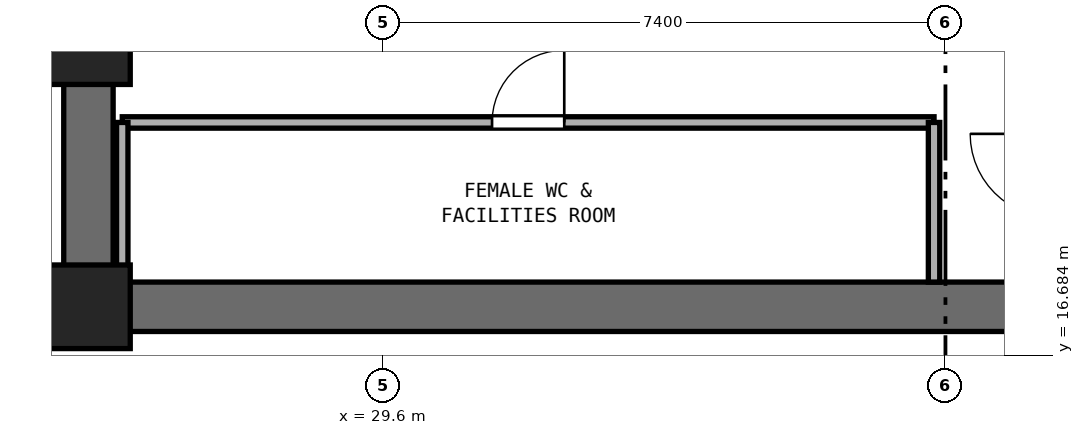
"""IFC4 building model, lengths in metres.
Left out: names, types, materials, properties, quantities, classifications, styles, units other than length and angle.
Written with IfcOpenShell. Run it as: python <this file> out.ifc"""

import sys

from ifc_helpers import new_model, si_unit, direction, frame, frame_2d, origin, origin_2d, place, context, subcontext, project, spatial, rectangle, extrude, element, fill, save


model = new_model("IFC4")
c1 = context("Model", 3, precision=1e-05, world=origin(), true_north=direction((0.0, 1.0)))
c2 = subcontext(c1, "Body", "Model", "MODEL_VIEW")
j1 = project(units=[si_unit("LENGTHUNIT", "METRE"), si_unit("PLANEANGLEUNIT", "RADIAN")], contexts=[c1])
p1 = place(None, origin())
s1 = spatial("IfcSite", under=j1, at=p1, CompositionType="ELEMENT")
p2 = place(p1, origin())
s2 = spatial("IfcBuilding", under=s1, at=p2, CompositionType="ELEMENT")
p3 = place(p2, frame((0.0, 0.0, 10.0)))
s3 = spatial("IfcBuildingStorey", under=s2, at=p3, CompositionType="ELEMENT", Elevation=10.0)
p4 = place(p3, frame((25.4, 17.325, 0.0), z_axis=(0.0, 0.0, 1.0), x_axis=(1.0, 0.0, 0.0)))
e1 = element("IfcWall", 1, at=p4, inside=s3, PredefinedType="SHEAR", context=c2, shape_type="SweptSolid", body=[
    extrude(rectangle(XDim=23.2, YDim=0.65, at=frame_2d((11.6, 0.0))), origin(), (0.0, 0.0, 1.0), 4.68),
])
p5 = place(p3, frame((25.725, 17.65, 0.0), z_axis=(0.0, 0.0, 1.0), x_axis=(0.0, 1.0, 0.0)))
e2 = element("IfcWall", 2, at=p5, inside=s3, PredefinedType="SHEAR", context=c2, shape_type="SweptSolid", body=[
    extrude(rectangle(XDim=15.1, YDim=0.65, at=frame_2d((7.55, 0.0))), origin(), (0.0, 0.0, 1.0), 4.68),
])
p6 = place(p5, frame((6.8, 0.0, 0.0)))
e3 = element("IfcOpeningElement", 3, at=p6, cuts=e2, PredefinedType="OPENING", context=c2, shape_type="SweptSolid", body=[
    extrude(rectangle(XDim=1.5, YDim=2.15, at=frame_2d((0.75, 1.075))), frame((0.0, 0.335, 0.0), z_axis=(0.0, -1.0, 0.0), x_axis=(1.0, 0.0, 0.0)), (0.0, 0.0, 1.0), 0.67),
])
for number, where, z_axis, x_axis in (
    (4, (25.725, 17.325, 0.0), (0.0, 0.0, 1.0), (1.0, 0.0, 0.0)),
    (5, (25.725, 20.8, 0.0), (0.0, 0.0, 1.0), (1.0, 0.0, 0.0)),
):
    element("IfcColumn", number, at=place(p3, frame(where, z_axis=z_axis, x_axis=x_axis)), inside=s3, PredefinedType="PILASTER", context=c2, shape_type="SweptSolid", body=[
        extrude(rectangle(XDim=1.1, YDim=1.1, at=origin_2d()), origin(), (0.0, 0.0, 1.0), 5.0),
    ])
p7 = place(p3, frame((26.17, 19.75, 0.0), z_axis=(0.0, 0.0, 1.0), x_axis=(1.0, 0.0, 0.0)))
e6 = element("IfcWall", 6, at=p7, inside=s3, PredefinedType="PARTITIONING", context=c2, shape_type="SweptSolid", body=[
    extrude(rectangle(XDim=10.68, YDim=0.15, at=frame_2d((5.34, 0.0))), origin(), (0.0, 0.0, 1.0), 4.68),
])
p8 = place(p7, frame((4.865, 0.0, 0.0)))
e7 = element("IfcOpeningElement", 7, at=p8, cuts=e6, PredefinedType="OPENING", context=c2, shape_type="SweptSolid", body=[
    extrude(rectangle(XDim=0.95, YDim=2.1, at=frame_2d((0.475, 1.05))), frame((0.0, 0.085, 0.0), z_axis=(0.0, -1.0, 0.0), x_axis=(1.0, 0.0, 0.0)), (0.0, 0.0, 1.0), 0.17),
])
for number, where, z_axis, x_axis in (
    (8, (26.17, 17.65, 0.0), (0.0, 0.0, 1.0), (0.0, 1.0, 0.0)),
    (9, (36.85, 17.65, 0.0), (0.0, 0.0, 1.0), (0.0, 1.0, 0.0)),
):
    element("IfcWall", number, at=place(p3, frame(where, z_axis=z_axis, x_axis=x_axis)), inside=s3, PredefinedType="PARTITIONING", context=c2, shape_type="SweptSolid", body=[
        extrude(rectangle(XDim=2.1, YDim=0.15, at=frame_2d((1.05, 0.0))), origin(), (0.0, 0.0, 1.0), 4.68),
    ])
p9 = place(p8, origin())
e10 = element("IfcDoor", 10, at=p9, inside=s3, OperationType="SINGLE_SWING_RIGHT", PredefinedType="DOOR", context=c2, shape_type="SweptSolid", body=[
    extrude(rectangle(XDim=0.95, YDim=2.1, at=frame_2d((0.475, 1.05))), frame((0.0, 0.025, 0.0), z_axis=(0.0, -1.0, 0.0), x_axis=(1.0, 0.0, 0.0)), (0.0, 0.0, 1.0), 0.05),
])
fill(e7, e10)
save(model, sys.argv[1])
